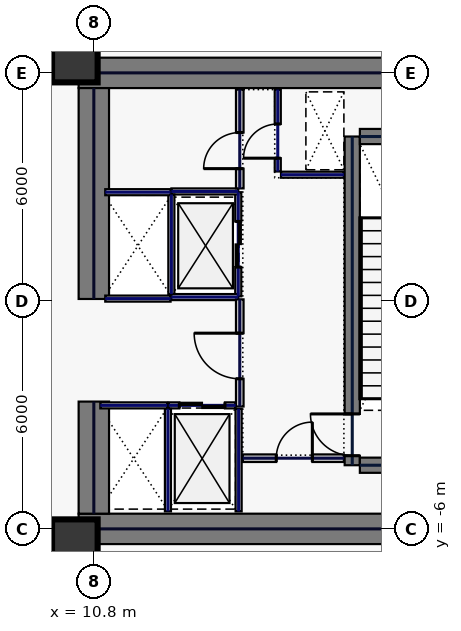
"""IFC4 building model, lengths in metres.
Left out: names, types, materials, properties, quantities, classifications, styles, units other than length and angle.
Written with IfcOpenShell. Run it as: python <this file> out.ifc"""

import sys

from ifc_helpers import new_model, si_unit, direction, frame, frame_2d, origin, origin_2d, place, context, subcontext, project, spatial, rectangle, hollow_rectangle, extrude, element, fill, save


model = new_model("IFC4")
c1 = context("Model", 3, precision=1e-05, world=origin(), true_north=direction((0.0, 1.0)))
c2 = subcontext(c1, "Body", "Model", "MODEL_VIEW")
j1 = project(units=[si_unit("LENGTHUNIT", "METRE"), si_unit("PLANEANGLEUNIT", "RADIAN")], contexts=[c1])
p1 = place(None, origin())
s1 = spatial("IfcSite", under=j1, at=p1, CompositionType="ELEMENT")
p2 = place(p1, origin())
s2 = spatial("IfcBuilding", under=s1, at=p2, CompositionType="ELEMENT")
p3 = place(p2, frame((0.0, 0.0, 18.4)))
s3 = spatial("IfcBuildingStorey", under=s2, at=p3, CompositionType="ELEMENT", Elevation=18.4)
for number, where, z_axis, x_axis in (
    (1, (10.4, 6.0, 0.0), (0.0, 0.0, 1.0), (1.0, 0.0, 0.0)),
    (2, (10.4, -6.0, 0.0), (0.0, 0.0, 1.0), (1.0, 0.0, 0.0)),
):
    element("IfcWall", number, at=place(p3, frame(where, z_axis=z_axis, x_axis=x_axis)), inside=s3, PredefinedType="SHEAR", context=c2, shape_type="SweptSolid", body=[
        extrude(rectangle(XDim=11.6, YDim=0.8, at=frame_2d((5.8, 0.0))), origin(), (0.0, 0.0, 1.0), 4.7),
    ])
p4 = place(p3, frame((10.8, -5.6, 0.0), z_axis=(0.0, 0.0, 1.0), x_axis=(0.0, 1.0, 0.0)))
e3 = element("IfcWall", 3, at=p4, inside=s3, PredefinedType="SHEAR", context=c2, shape_type="SweptSolid", body=[
    extrude(rectangle(XDim=2.95, YDim=0.8, at=frame_2d((1.475, 0.0))), origin(), (0.0, 0.0, 1.0), 4.7),
])
p5 = place(p3, frame((10.8, 0.05, 0.0), z_axis=(0.0, 0.0, 1.0), x_axis=(0.0, 1.0, 0.0)))
e4 = element("IfcWall", 4, at=p5, inside=s3, PredefinedType="SHEAR", context=c2, shape_type="SweptSolid", body=[
    extrude(rectangle(XDim=5.55, YDim=0.8, at=frame_2d((2.775, 0.0))), origin(), (0.0, 0.0, 1.0), 4.7),
])
p6 = place(p3, frame((17.6, -4.325, 0.0), z_axis=(0.0, 0.0, 1.0), x_axis=(0.0, 1.0, 0.0)))
e5 = element("IfcWall", 5, at=p6, inside=s3, PredefinedType="SHEAR", context=c2, shape_type="SweptSolid", body=[
    extrude(rectangle(XDim=8.65, YDim=0.4, at=frame_2d((4.325, 0.0))), origin(), (0.0, 0.0, 1.0), 4.7),
])
p7 = place(p6, frame((0.25, 0.0, 0.0)))
e6 = element("IfcOpeningElement", 6, at=p7, cuts=e5, PredefinedType="OPENING", context=c2, shape_type="SweptSolid", body=[
    extrude(rectangle(XDim=1.1, YDim=2.2, at=frame_2d((0.55, 1.1))), frame((0.0, 0.21, 0.0), z_axis=(0.0, -1.0, 0.0), x_axis=(1.0, 0.0, 0.0)), (0.0, 0.0, 1.0), 0.42),
])
for number, where, z_axis, x_axis in (
    (7, (17.8, -4.325, 0.0), (0.0, 0.0, 1.0), (1.0, 0.0, 0.0)),
    (8, (17.8, 4.325, 0.0), (0.0, 0.0, 1.0), (1.0, 0.0, 0.0)),
):
    element("IfcWall", number, at=place(p3, frame(where, z_axis=z_axis, x_axis=x_axis)), inside=s3, PredefinedType="SHEAR", context=c2, shape_type="SweptSolid", body=[
        extrude(rectangle(XDim=3.4, YDim=0.4, at=frame_2d((1.7, 0.0))), origin(), (0.0, 0.0, 1.0), 4.7),
    ])
for number, where, z_axis, x_axis in (
    (9, (10.3, -6.35, 0.0), (0.0, 0.0, 1.0), (1.0, 0.0, 0.0)),
    (10, (10.3, 6.35, 0.0), (0.0, 0.0, 1.0), (1.0, 0.0, 0.0)),
):
    element("IfcColumn", number, at=place(p3, frame(where, z_axis=z_axis, x_axis=x_axis)), inside=s3, PredefinedType="COLUMN", context=c2, shape_type="SweptSolid", body=[
        extrude(hollow_rectangle(XDim=1.2, YDim=1.2, WallThickness=0.05, at=origin_2d()), origin(), (0.0, 0.0, 1.0), 4.7),
    ])
p8 = place(p3, frame((14.6, 0.12, 0.0), z_axis=(0.0, 0.0, 1.0), x_axis=(0.0, 1.0, 0.0)))
e11 = element("IfcWall", 11, at=p8, inside=s3, PredefinedType="PARTITIONING", context=c2, shape_type="SweptSolid", body=[
    extrude(rectangle(XDim=2.74, YDim=0.16, at=frame_2d((1.37, 0.0))), origin(), (0.0, 0.0, 1.0), 4.7),
])
p9 = place(p8, frame((0.77, 0.0, 0.0)))
e12 = element("IfcOpeningElement", 12, at=p9, cuts=e11, PredefinedType="OPENING", context=c2, shape_type="SweptSolid", body=[
    extrude(rectangle(XDim=1.2, YDim=2.2, at=frame_2d((0.6, 1.1))), frame((0.0, 0.09, 0.0), z_axis=(0.0, -1.0, 0.0), x_axis=(1.0, 0.0, 0.0)), (0.0, 0.0, 1.0), 0.18),
])
for number, where, z_axis, x_axis in (
    (13, (12.84, 0.1, 0.0), (0.0, 0.0, 1.0), (1.0, 0.0, 0.0)),
    (14, (12.84, 2.88, 0.0), (0.0, 0.0, 1.0), (1.0, 0.0, 0.0)),
):
    element("IfcWall", number, at=place(p3, frame(where, z_axis=z_axis, x_axis=x_axis)), inside=s3, PredefinedType="PARTITIONING", context=c2, shape_type="SweptSolid", body=[
        extrude(rectangle(XDim=1.76, YDim=0.16, at=frame_2d((0.88, 0.0))), origin(), (0.0, 0.0, 1.0), 4.7),
    ])
p10 = place(p3, frame((12.84, 0.18, 0.0), z_axis=(0.0, 0.0, 1.0), x_axis=(0.0, 1.0, 0.0)))
e15 = element("IfcWall", 15, at=p10, inside=s3, PredefinedType="PARTITIONING", context=c2, shape_type="SweptSolid", body=[
    extrude(rectangle(XDim=2.62, YDim=0.16, at=frame_2d((1.31, 0.0))), origin(), (0.0, 0.0, 1.0), 4.7),
])
p11 = place(p3, frame((12.77, -2.75, 0.0), z_axis=(0.0, 0.0, 1.0), x_axis=(1.0, 0.0, 0.0)))
e16 = element("IfcWall", 16, at=p11, inside=s3, PredefinedType="PARTITIONING", context=c2, shape_type="SweptSolid", body=[
    extrude(rectangle(XDim=1.76, YDim=0.16, at=frame_2d((0.88, 0.0))), origin(), (0.0, 0.0, 1.0), 4.7),
])
p12 = place(p11, frame((0.28, 0.0, 0.0)))
e17 = element("IfcOpeningElement", 17, at=p12, cuts=e16, PredefinedType="OPENING", context=c2, shape_type="SweptSolid", body=[
    extrude(rectangle(XDim=1.2, YDim=2.2, at=frame_2d((0.6, 1.1))), frame((0.0, 0.09, 0.0), z_axis=(0.0, -1.0, 0.0), x_axis=(1.0, 0.0, 0.0)), (0.0, 0.0, 1.0), 0.18),
])
for number, where, z_axis, x_axis in (
    (18, (12.75, -5.54, 0.0), (0.0, 0.0, 1.0), (0.0, 1.0, 0.0)),
    (19, (14.61, -5.54, 0.0), (0.0, 0.0, 1.0), (0.0, 1.0, 0.0)),
):
    element("IfcWall", number, at=place(p3, frame(where, z_axis=z_axis, x_axis=x_axis)), inside=s3, PredefinedType="PARTITIONING", context=c2, shape_type="SweptSolid", body=[
        extrude(rectangle(XDim=2.7, YDim=0.16, at=frame_2d((1.35, 0.0))), origin(), (0.0, 0.0, 1.0), 4.7),
    ])
p13 = place(p3, frame((10.97, -2.75, 0.0), z_axis=(0.0, 0.0, 1.0), x_axis=(1.0, 0.0, 0.0)))
e20 = element("IfcWall", 20, at=p13, inside=s3, PredefinedType="PARTITIONING", context=c2, shape_type="SweptSolid", body=[
    extrude(rectangle(XDim=1.76, YDim=0.16, at=frame_2d((0.88, 0.0))), origin(), (0.0, 0.0, 1.0), 4.7),
])
for number, where, z_axis, x_axis in (
    (21, (11.1, 0.06, 0.0), (0.0, 0.0, 1.0), (1.0, 0.0, 0.0)),
    (22, (11.1, 2.86, 0.0), (0.0, 0.0, 1.0), (1.0, 0.0, 0.0)),
):
    element("IfcWall", number, at=place(p3, frame(where, z_axis=z_axis, x_axis=x_axis)), inside=s3, PredefinedType="PARTITIONING", context=c2, shape_type="SweptSolid", body=[
        extrude(rectangle(XDim=1.72, YDim=0.16, at=frame_2d((0.86, 0.0))), origin(), (0.0, 0.0, 1.0), 4.7),
    ])
p14 = place(p3, frame((15.64, 3.405, 0.0), z_axis=(0.0, 0.0, 1.0), x_axis=(0.0, 1.0, 0.0)))
e23 = element("IfcWall", 23, at=p14, inside=s3, PredefinedType="PARTITIONING", context=c2, shape_type="SweptSolid", body=[
    extrude(rectangle(XDim=2.155, YDim=0.16, at=frame_2d((1.078, 0.0))), origin(), (0.0, 0.0, 1.0), 4.7),
])
p15 = place(p14, frame((0.35, 0.0, 0.0)))
e24 = element("IfcOpeningElement", 24, at=p15, cuts=e23, PredefinedType="OPENING", context=c2, shape_type="SweptSolid", body=[
    extrude(rectangle(XDim=0.9, YDim=2.2, at=frame_2d((0.45, 1.1))), frame((0.0, 0.09, 0.0), z_axis=(0.0, -1.0, 0.0), x_axis=(1.0, 0.0, 0.0)), (0.0, 0.0, 1.0), 0.18),
])
p16 = place(p3, frame((15.725, 3.32, 0.0), z_axis=(0.0, 0.0, 1.0), x_axis=(1.0, 0.0, 0.0)))
e25 = element("IfcWall", 25, at=p16, inside=s3, PredefinedType="PARTITIONING", context=c2, shape_type="SweptSolid", body=[
    extrude(rectangle(XDim=1.655, YDim=0.16, at=frame_2d((0.827, 0.0))), origin(), (0.0, 0.0, 1.0), 4.7),
])
p17 = place(p3, frame((14.72, -4.14, 0.0), z_axis=(0.0, 0.0, 1.0), x_axis=(1.0, 0.0, 0.0)))
e26 = element("IfcWall", 26, at=p17, inside=s3, PredefinedType="SOLIDWALL", context=c2, shape_type="SweptSolid", body=[
    extrude(rectangle(XDim=2.66, YDim=0.2, at=frame_2d((1.33, 0.0))), origin(), (0.0, 0.0, 1.0), 4.7),
])
p18 = place(p17, frame((0.88, 0.0, 0.0)))
e27 = element("IfcOpeningElement", 27, at=p18, cuts=e26, PredefinedType="OPENING", context=c2, shape_type="SweptSolid", body=[
    extrude(rectangle(XDim=0.95, YDim=2.2, at=frame_2d((0.475, 1.1))), frame((0.0, 0.11, 0.0), z_axis=(0.0, -1.0, 0.0), x_axis=(1.0, 0.0, 0.0)), (0.0, 0.0, 1.0), 0.22),
])
p19 = place(p3, frame((14.64, 2.96, 0.0), z_axis=(0.0, 0.0, 1.0), x_axis=(0.0, 1.0, 0.0)))
e28 = element("IfcWall", 28, at=p19, inside=s3, PredefinedType="SOLIDWALL", context=c2, shape_type="SweptSolid", body=[
    extrude(rectangle(XDim=2.6, YDim=0.2, at=frame_2d((1.3, 0.0))), origin(), (0.0, 0.0, 1.0), 4.7),
])
p20 = place(p19, frame((0.52, 0.0, 0.0)))
e29 = element("IfcOpeningElement", 29, at=p20, cuts=e28, PredefinedType="OPENING", context=c2, shape_type="SweptSolid", body=[
    extrude(rectangle(XDim=0.95, YDim=2.2, at=frame_2d((0.475, 1.1))), frame((0.0, 0.11, 0.0), z_axis=(0.0, -1.0, 0.0), x_axis=(1.0, 0.0, 0.0)), (0.0, 0.0, 1.0), 0.22),
])
p21 = place(p3, frame((14.64, -2.78, 0.0), z_axis=(0.0, 0.0, 1.0), x_axis=(0.0, 1.0, 0.0)))
e30 = element("IfcWall", 30, at=p21, inside=s3, PredefinedType="SOLIDWALL", context=c2, shape_type="SweptSolid", body=[
    extrude(rectangle(XDim=2.82, YDim=0.2, at=frame_2d((1.41, 0.0))), origin(), (0.0, 0.0, 1.0), 4.7),
])
p22 = place(p21, frame((0.73, 0.0, 0.0)))
e31 = element("IfcOpeningElement", 31, at=p22, cuts=e30, PredefinedType="OPENING", context=c2, shape_type="SweptSolid", body=[
    extrude(rectangle(XDim=1.2, YDim=2.2, at=frame_2d((0.6, 1.1))), frame((0.0, 0.11, 0.0), z_axis=(0.0, -1.0, 0.0), x_axis=(1.0, 0.0, 0.0)), (0.0, 0.0, 1.0), 0.22),
])
for number, where, z_axis, x_axis in (
    (32, (10.58, 7.485, 0.0), (0.0, 0.0, 1.0), (0.0, -1.0, 0.0)),
    (33, (10.58, -6.42, 0.0), (0.0, 0.0, 1.0), (0.0, -1.0, 0.0)),
):
    element("IfcWall", number, at=place(p3, frame(where, z_axis=z_axis, x_axis=x_axis)), inside=s3, PredefinedType="PARTITIONING", context=c2, shape_type="SweptSolid", body=[
        extrude(rectangle(XDim=1.065, YDim=0.16, at=frame_2d((0.533, 0.0))), origin(), (0.0, 0.0, 1.0), 4.7),
    ])
p23 = place(p7, origin())
e34 = element("IfcDoor", 34, at=p23, inside=s3, OperationType="SINGLE_SWING_RIGHT", PredefinedType="DOOR", context=c2, shape_type="SweptSolid", body=[
    extrude(rectangle(XDim=1.1, YDim=2.2, at=frame_2d((0.55, 1.1))), frame((0.0, 0.025, 0.0), z_axis=(0.0, -1.0, 0.0), x_axis=(1.0, 0.0, 0.0)), (0.0, 0.0, 1.0), 0.05),
])
fill(e6, e34)
p24 = place(p9, origin())
e35 = element("IfcDoor", 35, at=p24, inside=s3, OperationType="SLIDING_TO_LEFT", PredefinedType="DOOR", context=c2, shape_type="SweptSolid", body=[
    extrude(rectangle(XDim=1.2, YDim=2.2, at=frame_2d((0.6, 1.1))), frame((0.0, 0.025, 0.0), z_axis=(0.0, -1.0, 0.0), x_axis=(1.0, 0.0, 0.0)), (0.0, 0.0, 1.0), 0.05),
])
fill(e12, e35)
p25 = place(p12, origin())
e36 = element("IfcDoor", 36, at=p25, inside=s3, OperationType="SLIDING_TO_LEFT", PredefinedType="DOOR", context=c2, shape_type="SweptSolid", body=[
    extrude(rectangle(XDim=1.2, YDim=2.2, at=frame_2d((0.6, 1.1))), frame((0.0, 0.025, 0.0), z_axis=(0.0, -1.0, 0.0), x_axis=(1.0, 0.0, 0.0)), (0.0, 0.0, 1.0), 0.05),
])
fill(e17, e36)
p26 = place(p15, origin())
e37 = element("IfcDoor", 37, at=p26, inside=s3, OperationType="SINGLE_SWING_LEFT", PredefinedType="DOOR", context=c2, shape_type="SweptSolid", body=[
    extrude(rectangle(XDim=0.9, YDim=2.2, at=frame_2d((0.45, 1.1))), frame((0.0, 0.025, 0.0), z_axis=(0.0, -1.0, 0.0), x_axis=(1.0, 0.0, 0.0)), (0.0, 0.0, 1.0), 0.05),
])
fill(e24, e37)
p27 = place(p18, origin())
e38 = element("IfcDoor", 38, at=p27, inside=s3, OperationType="SINGLE_SWING_RIGHT", PredefinedType="DOOR", context=c2, shape_type="SweptSolid", body=[
    extrude(rectangle(XDim=0.95, YDim=2.2, at=frame_2d((0.475, 1.1))), frame((0.0, 0.025, 0.0), z_axis=(0.0, -1.0, 0.0), x_axis=(1.0, 0.0, 0.0)), (0.0, 0.0, 1.0), 0.05),
])
fill(e27, e38)
p28 = place(p20, origin())
e39 = element("IfcDoor", 39, at=p28, inside=s3, OperationType="SINGLE_SWING_LEFT", PredefinedType="DOOR", context=c2, shape_type="SweptSolid", body=[
    extrude(rectangle(XDim=0.95, YDim=2.2, at=frame_2d((0.475, 1.1))), frame((0.0, 0.025, 0.0), z_axis=(0.0, -1.0, 0.0), x_axis=(1.0, 0.0, 0.0)), (0.0, 0.0, 1.0), 0.05),
])
fill(e29, e39)
p29 = place(p22, origin())
e40 = element("IfcDoor", 40, at=p29, inside=s3, OperationType="SINGLE_SWING_RIGHT", PredefinedType="DOOR", context=c2, shape_type="SweptSolid", body=[
    extrude(rectangle(XDim=1.2, YDim=2.2, at=frame_2d((0.6, 1.1))), frame((0.0, 0.025, 0.0), z_axis=(0.0, -1.0, 0.0), x_axis=(1.0, 0.0, 0.0)), (0.0, 0.0, 1.0), 0.05),
])
fill(e31, e40)
save(model, sys.argv[1])
